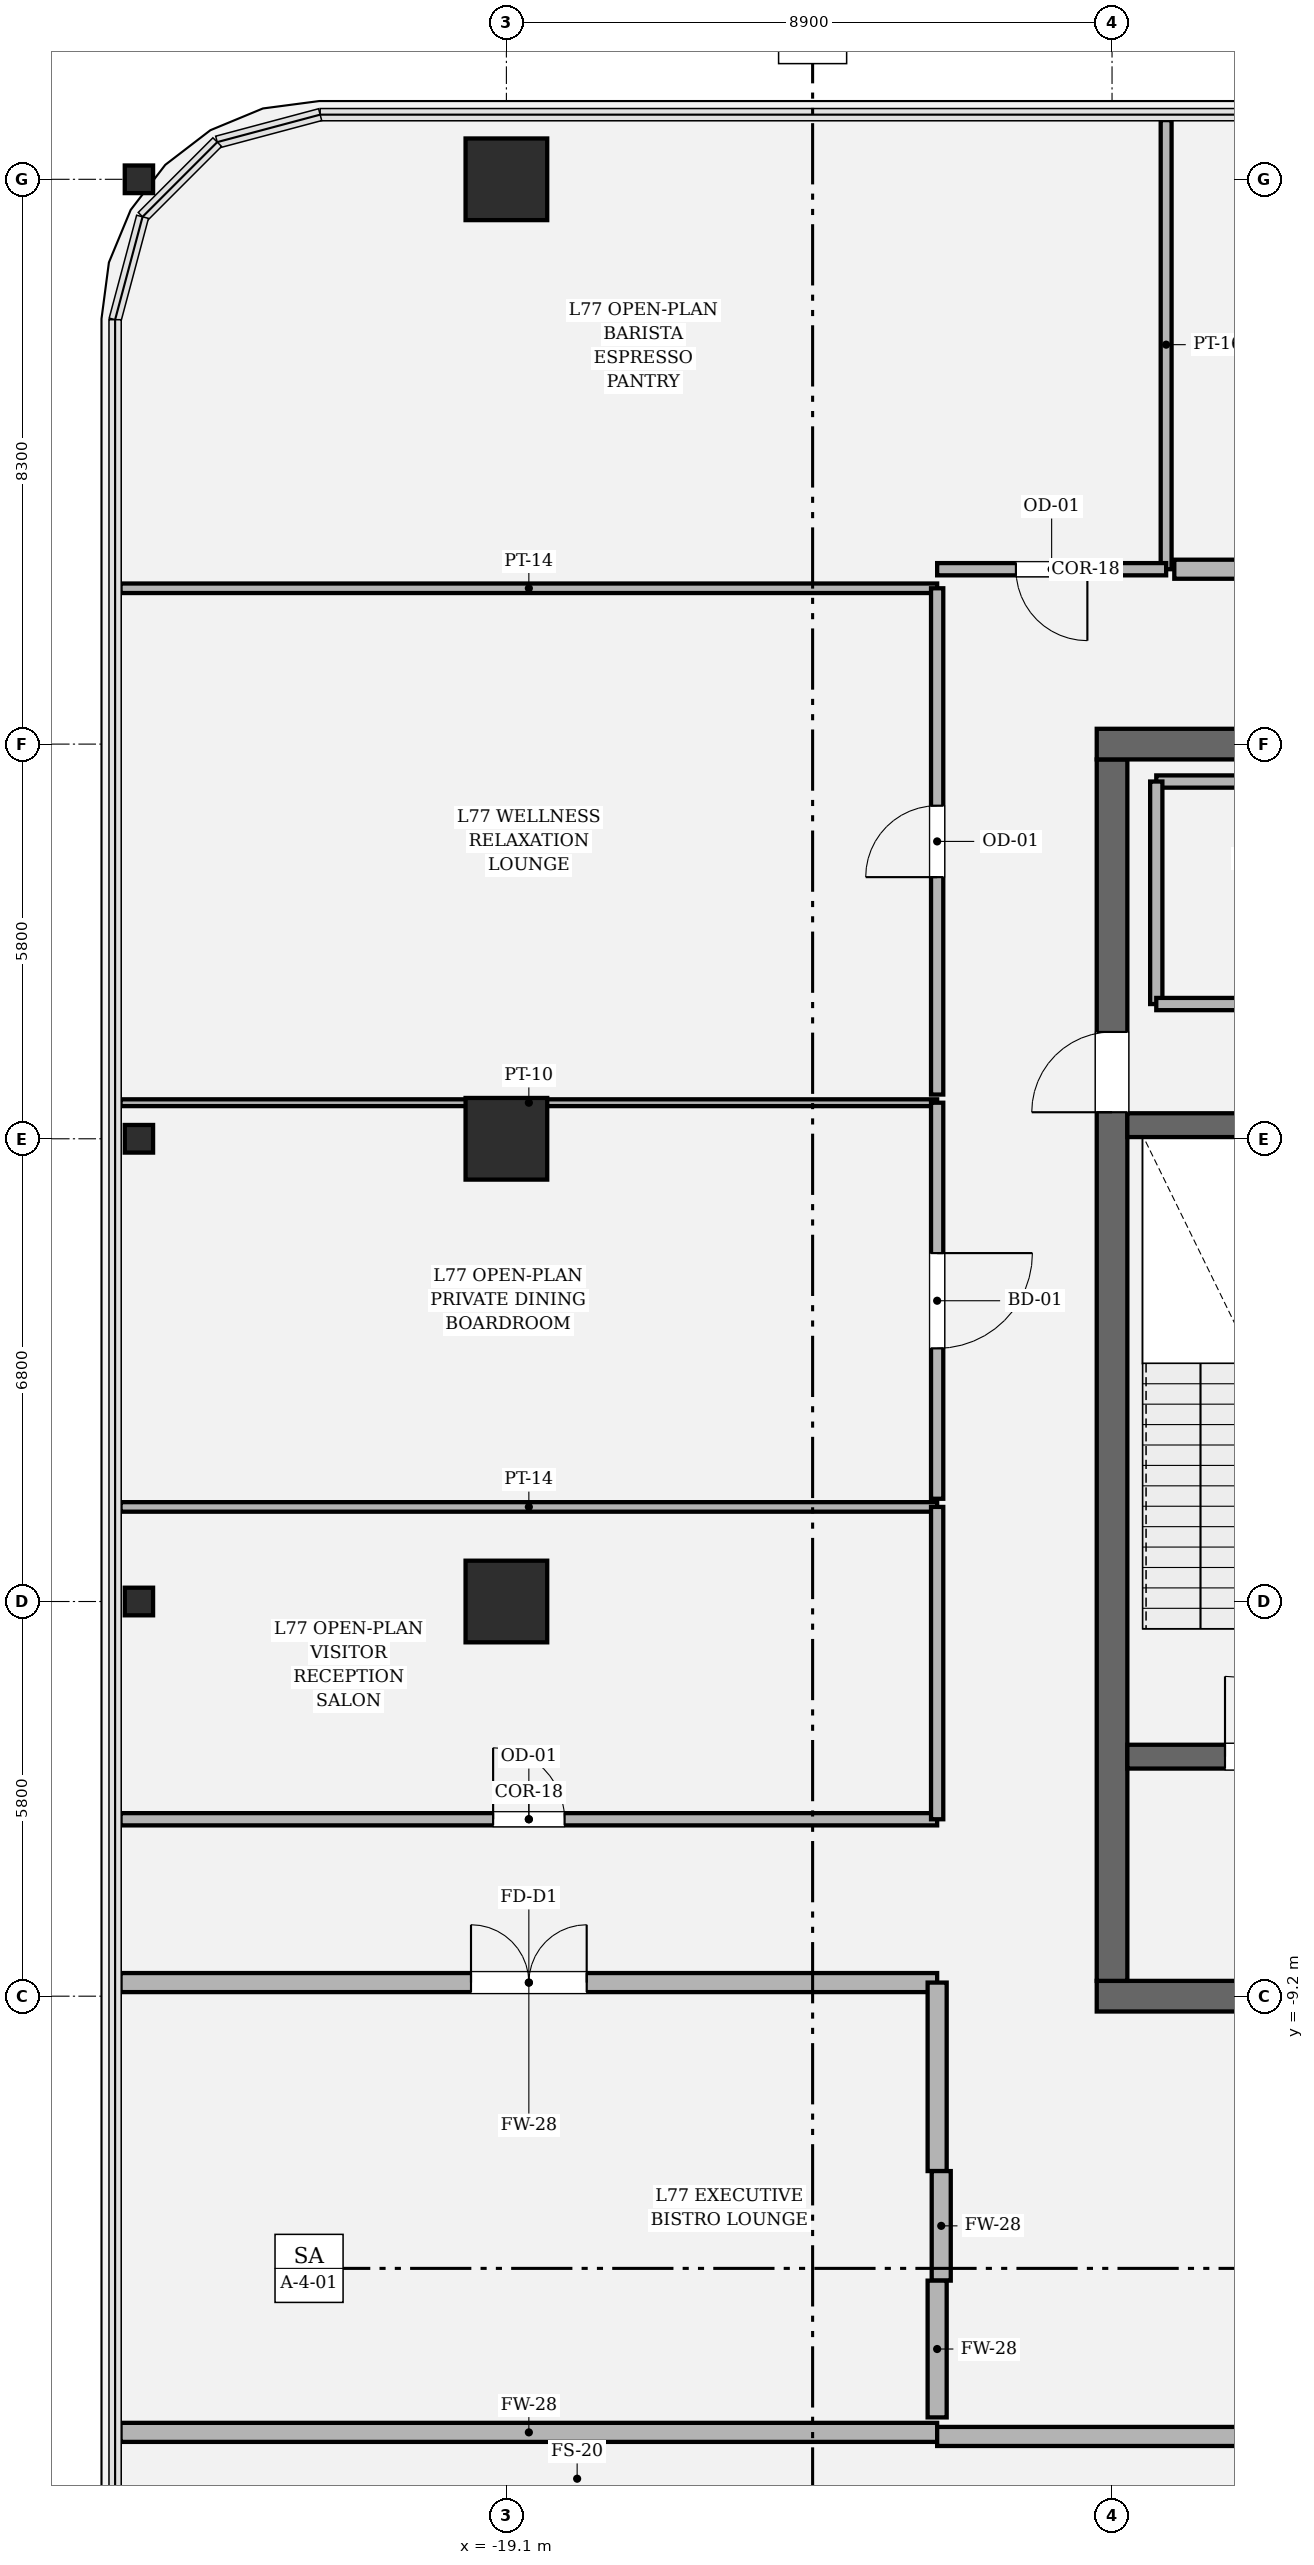
"""IFC4 building model, lengths in metres.
Left out: names, types, materials, properties, quantities, classifications, styles, units other than length and angle.
Written with IfcOpenShell. Run it as: python <this file> out.ifc"""

import sys

from ifc_helpers import new_model, si_unit, direction, frame, frame_2d, origin, origin_2d, place, context, subcontext, project, spatial, rectangle, hollow_rectangle, i_section, extrude, element, fill, save


model = new_model("IFC4")
c1 = context("Model", 3, precision=1e-05, world=origin(), true_north=direction((0.0, 1.0)))
c2 = subcontext(c1, "Body", "Model", "MODEL_VIEW")
j1 = project(units=[si_unit("LENGTHUNIT", "METRE"), si_unit("PLANEANGLEUNIT", "RADIAN")], contexts=[c1])
p1 = place(None, origin())
s1 = spatial("IfcSite", under=j1, at=p1, CompositionType="ELEMENT")
p2 = place(p1, origin())
s2 = spatial("IfcBuilding", under=s1, at=p2, CompositionType="ELEMENT")
p3 = place(p2, frame((0.0, 0.0, 325.8)))
s3 = spatial("IfcBuildingStorey", under=s2, at=p3, CompositionType="ELEMENT", Elevation=325.8)
p4 = place(p3, frame((10.425, -9.2, 0.0), z_axis=(0.0, 0.0, 1.0), x_axis=(-1.0, 0.0, 0.0)))
e1 = element("IfcWall", 1, at=p4, inside=s3, PredefinedType="SHEAR", context=c2, shape_type="SweptSolid", body=[
    extrude(rectangle(XDim=20.85, YDim=0.45, at=frame_2d((10.425, 0.0))), origin(), (0.0, 0.0, 1.0), 4.2),
])
p5 = place(p4, frame((2.7, 0.0, 0.0)))
e2 = element("IfcOpeningElement", 2, at=p5, cuts=e1, PredefinedType="OPENING", context=c2, shape_type="SweptSolid", body=[
    extrude(rectangle(XDim=1.25, YDim=2.25, at=frame_2d((0.625, 1.125))), frame((0.0, 0.235, 0.0), z_axis=(0.0, -1.0, 0.0), x_axis=(1.0, 0.0, 0.0)), (0.0, 0.0, 1.0), 0.47),
])
p6 = place(p4, frame((16.9, 0.0, 0.0)))
e3 = element("IfcOpeningElement", 3, at=p6, cuts=e1, PredefinedType="OPENING", context=c2, shape_type="SweptSolid", body=[
    extrude(rectangle(XDim=1.25, YDim=2.25, at=frame_2d((0.625, 1.125))), frame((0.0, 0.235, 0.0), z_axis=(0.0, -1.0, 0.0), x_axis=(1.0, 0.0, 0.0)), (0.0, 0.0, 1.0), 0.47),
])
p7 = place(p3, frame((-10.2, -8.975, 0.0), z_axis=(0.0, 0.0, 1.0), x_axis=(0.0, 1.0, 0.0)))
e4 = element("IfcWall", 4, at=p7, inside=s3, PredefinedType="SHEAR", context=c2, shape_type="SweptSolid", body=[
    extrude(rectangle(XDim=17.95, YDim=0.45, at=frame_2d((8.975, 0.0))), origin(), (0.0, 0.0, 1.0), 4.2),
])
p8 = place(p7, frame((12.765, 0.0, 0.0)))
e5 = element("IfcOpeningElement", 5, at=p8, cuts=e4, PredefinedType="OPENING", context=c2, shape_type="SweptSolid", body=[
    extrude(rectangle(XDim=1.18, YDim=2.2, at=frame_2d((0.59, 1.1))), frame((0.0, 0.235, 0.0), z_axis=(0.0, -1.0, 0.0), x_axis=(1.0, 0.0, 0.0)), (0.0, 0.0, 1.0), 0.47),
])
p9 = place(p3, frame((-10.425, 9.2, 0.0), z_axis=(0.0, 0.0, 1.0), x_axis=(1.0, 0.0, 0.0)))
e6 = element("IfcWall", 6, at=p9, inside=s3, PredefinedType="SHEAR", context=c2, shape_type="SweptSolid", body=[
    extrude(rectangle(XDim=20.85, YDim=0.45, at=frame_2d((10.425, 0.0))), origin(), (0.0, 0.0, 1.0), 4.2),
])
p10 = place(p3, frame((-9.975, -5.68, 0.0), z_axis=(0.0, 0.0, 1.0), x_axis=(1.0, 0.0, 0.0)))
e7 = element("IfcWall", 7, at=p10, inside=s3, PredefinedType="SOLIDWALL", context=c2, shape_type="SweptSolid", body=[
    extrude(rectangle(XDim=5.325, YDim=0.35, at=frame_2d((2.663, 0.0))), origin(), (0.0, 0.0, 1.0), 4.2),
])
p11 = place(p10, frame((1.435, 0.0, 0.0)))
e8 = element("IfcOpeningElement", 8, at=p11, cuts=e7, PredefinedType="OPENING", context=c2, shape_type="SweptSolid", body=[
    extrude(rectangle(XDim=1.18, YDim=2.2, at=frame_2d((0.59, 1.1))), frame((0.0, 0.185, 0.0), z_axis=(0.0, -1.0, 0.0), x_axis=(1.0, 0.0, 0.0)), (0.0, 0.0, 1.0), 0.37),
])
p12 = place(p3, frame((-9.975, 3.6, 0.0), z_axis=(0.0, 0.0, 1.0), x_axis=(1.0, 0.0, 0.0)))
e9 = element("IfcWall", 9, at=p12, inside=s3, PredefinedType="SOLIDWALL", context=c2, shape_type="SweptSolid", body=[
    extrude(rectangle(XDim=5.325, YDim=0.35, at=frame_2d((2.663, 0.0))), origin(), (0.0, 0.0, 1.0), 4.2),
])
for number, where, z_axis, x_axis in (
    (10, (-19.1, 17.5, 0.0), (0.0, 0.0, 1.0), (1.0, 0.0, 0.0)),
    (11, (-19.1, 3.4, 0.0), (0.0, 0.0, 1.0), (1.0, 0.0, 0.0)),
    (12, (-19.1, -3.4, 0.0), (0.0, 0.0, 1.0), (1.0, 0.0, 0.0)),
):
    element("IfcColumn", number, at=place(p3, frame(where, z_axis=z_axis, x_axis=x_axis)), inside=s3, PredefinedType="COLUMN", context=c2, shape_type="SweptSolid", body=[
        extrude(hollow_rectangle(XDim=1.2, YDim=1.2, WallThickness=0.035, at=origin_2d()), origin(), (0.0, 0.0, 1.0), 4.2),
    ])
for number, where, z_axis, x_axis in (
    (13, (-24.5, -3.4, 0.0), (0.0, 0.0, 1.0), (0.0, 1.0, 0.0)),
    (14, (-24.5, 3.4, 0.0), (0.0, 0.0, 1.0), (0.0, 1.0, 0.0)),
    (15, (-24.5, 17.5, 0.0), (0.0, 0.0, 1.0), (0.0, 1.0, 0.0)),
):
    element("IfcColumn", number, at=place(p3, frame(where, z_axis=z_axis, x_axis=x_axis)), inside=s3, PredefinedType="COLUMN", context=c2, shape_type="SweptSolid", body=[
        extrude(i_section(OverallWidth=0.406, OverallDepth=0.416, WebThickness=0.029, FlangeThickness=0.048, FilletRadius=0.018, at=origin_2d()), origin(), (0.0, 0.0, 1.0), 4.198),
    ])
p13 = place(p3, frame((-5.05, 8.65, 0.0), z_axis=(0.0, 0.0, 1.0), x_axis=(-1.0, 0.0, 0.0)))
e16 = element("IfcWall", 16, at=p13, inside=s3, PredefinedType="PARTITIONING", context=c2, shape_type="SweptSolid", body=[
    extrude(rectangle(XDim=4.5, YDim=0.18, at=frame_2d((2.25, 0.0))), origin(), (0.0, 0.0, 1.0), 4.0),
])
p14 = place(p3, frame((-9.55, 8.65, 0.0), z_axis=(0.0, 0.0, 1.0), x_axis=(0.0, -1.0, 0.0)))
e17 = element("IfcWall", 17, at=p14, inside=s3, PredefinedType="PARTITIONING", context=c2, shape_type="SweptSolid", body=[
    extrude(rectangle(XDim=3.27, YDim=0.18, at=frame_2d((1.635, 0.0))), origin(), (0.0, 0.0, 1.0), 4.0),
])
p15 = place(p3, frame((-9.55, 5.38, 0.0), z_axis=(0.0, 0.0, 1.0), x_axis=(1.0, 0.0, 0.0)))
e18 = element("IfcWall", 18, at=p15, inside=s3, PredefinedType="PARTITIONING", context=c2, shape_type="SweptSolid", body=[
    extrude(rectangle(XDim=4.5, YDim=0.18, at=frame_2d((2.25, 0.0))), origin(), (0.0, 0.0, 1.0), 4.0),
])
p16 = place(p15, frame((1.725, 0.0, 0.0)))
e19 = element("IfcOpeningElement", 19, at=p16, cuts=e18, PredefinedType="OPENING", context=c2, shape_type="SweptSolid", body=[
    extrude(rectangle(XDim=1.05, YDim=2.2, at=frame_2d((0.525, 1.1))), frame((0.0, 0.1, 0.0), z_axis=(0.0, -1.0, 0.0), x_axis=(1.0, 0.0, 0.0)), (0.0, 0.0, 1.0), 0.2),
])
p17 = place(p3, frame((-24.77, -15.61, 0.0), z_axis=(0.0, 0.0, 1.0), x_axis=(1.0, 0.0, 0.0)))
e20 = element("IfcWall", 20, at=p17, inside=s3, PredefinedType="SOLIDWALL", context=c2, shape_type="SweptSolid", body=[
    extrude(rectangle(XDim=12.0, YDim=0.28, at=frame_2d((6.0, 0.0))), origin(), (0.0, 0.0, 1.0), 2.714),
])
p18 = place(p3, frame((-12.77, -15.67, 0.0), z_axis=(0.0, 0.0, 1.0), x_axis=(1.0, 0.0, 0.0)))
e21 = element("IfcWall", 21, at=p18, inside=s3, PredefinedType="SOLIDWALL", context=c2, shape_type="SweptSolid", body=[
    extrude(rectangle(XDim=25.54, YDim=0.28, at=frame_2d((12.77, 0.0))), origin(), (0.0, 0.0, 1.0), 3.394),
])
p19 = place(p18, frame((11.92, 0.0, 0.0)))
e22 = element("IfcOpeningElement", 22, at=p19, cuts=e21, PredefinedType="OPENING", context=c2, shape_type="SweptSolid", body=[
    extrude(rectangle(XDim=1.7, YDim=2.3, at=frame_2d((0.85, 1.15))), frame((0.0, 0.15, 0.0), z_axis=(0.0, -1.0, 0.0), x_axis=(1.0, 0.0, 0.0)), (0.0, 0.0, 1.0), 0.3),
])
p20 = place(p3, frame((-24.77, -9.0, 0.0), z_axis=(0.0, 0.0, 1.0), x_axis=(1.0, 0.0, 0.0)))
e23 = element("IfcWall", 23, at=p20, inside=s3, PredefinedType="SOLIDWALL", context=c2, shape_type="SweptSolid", body=[
    extrude(rectangle(XDim=12.0, YDim=0.28, at=frame_2d((6.0, 0.0))), origin(), (0.0, 0.0, 1.0), 2.714),
])
p21 = place(p20, frame((5.15, 0.0, 0.0)))
e24 = element("IfcOpeningElement", 24, at=p21, cuts=e23, PredefinedType="OPENING", context=c2, shape_type="SweptSolid", body=[
    extrude(rectangle(XDim=1.7, YDim=2.3, at=frame_2d((0.85, 1.15))), frame((0.0, 0.15, 0.0), z_axis=(0.0, -1.0, 0.0), x_axis=(1.0, 0.0, 0.0)), (0.0, 0.0, 1.0), 0.3),
])
p22 = place(p3, frame((-12.77, -9.0, 0.0), z_axis=(0.0, 0.0, 1.0), x_axis=(0.0, -1.0, 0.0)))
e25 = element("IfcWall", 25, at=p22, inside=s3, PredefinedType="SOLIDWALL", context=c2, shape_type="SweptSolid", body=[
    extrude(rectangle(XDim=2.77, YDim=0.28, at=frame_2d((1.385, 0.0))), origin(), (0.0, 0.0, 1.0), 3.394),
])
p23 = place(p3, frame((-12.71, -11.77, 0.0), z_axis=(0.0, 0.0, 1.0), x_axis=(0.0, -1.0, 0.0)))
e26 = element("IfcWall", 26, at=p23, inside=s3, PredefinedType="SOLIDWALL", context=c2, shape_type="SweptSolid", body=[
    extrude(rectangle(XDim=1.61, YDim=0.28, at=frame_2d((0.805, 0.0))), origin(), (0.0, 0.0, 1.0), 3.634),
])
p24 = place(p3, frame((-12.77, -13.38, 0.0), z_axis=(0.0, 0.0, 1.0), x_axis=(0.0, -1.0, 0.0)))
e27 = element("IfcWall", 27, at=p24, inside=s3, PredefinedType="SOLIDWALL", context=c2, shape_type="SweptSolid", body=[
    extrude(rectangle(XDim=2.01, YDim=0.28, at=frame_2d((1.005, 0.0))), origin(), (0.0, 0.0, 1.0), 3.634),
])
p25 = place(p3, frame((-12.77, -6.6, 0.0), z_axis=(0.0, 0.0, 1.0), x_axis=(-1.0, 0.0, 0.0)))
e28 = element("IfcWall", 28, at=p25, inside=s3, PredefinedType="PARTITIONING", context=c2, shape_type="SweptSolid", body=[
    extrude(rectangle(XDim=12.0, YDim=0.18, at=frame_2d((6.0, 0.0))), origin(), (0.0, 0.0, 1.0), 2.714),
])
p26 = place(p25, frame((5.475, 0.0, 0.0)))
e29 = element("IfcOpeningElement", 29, at=p26, cuts=e28, PredefinedType="OPENING", context=c2, shape_type="SweptSolid", body=[
    extrude(rectangle(XDim=1.05, YDim=2.2, at=frame_2d((0.525, 1.1))), frame((0.0, 0.1, 0.0), z_axis=(0.0, -1.0, 0.0), x_axis=(1.0, 0.0, 0.0)), (0.0, 0.0, 1.0), 0.2),
])
p27 = place(p3, frame((-24.77, -2.01, 0.0), z_axis=(0.0, 0.0, 1.0), x_axis=(1.0, 0.0, 0.0)))
e30 = element("IfcWall", 30, at=p27, inside=s3, PredefinedType="PARTITIONING", context=c2, shape_type="SweptSolid", body=[
    extrude(rectangle(XDim=12.0, YDim=0.14, at=frame_2d((6.0, 0.0))), origin(), (0.0, 0.0, 1.0), 2.714),
])
p28 = place(p3, frame((-12.77, -2.01, 0.0), z_axis=(0.0, 0.0, 1.0), x_axis=(0.0, -1.0, 0.0)))
e31 = element("IfcWall", 31, at=p28, inside=s3, PredefinedType="PARTITIONING", context=c2, shape_type="SweptSolid", body=[
    extrude(rectangle(XDim=4.59, YDim=0.18, at=frame_2d((2.295, 0.0))), origin(), (0.0, 0.0, 1.0), 3.394),
])
p29 = place(p3, frame((-24.77, 3.93, 0.0), z_axis=(0.0, 0.0, 1.0), x_axis=(1.0, 0.0, 0.0)))
e32 = element("IfcWall", 32, at=p29, inside=s3, PredefinedType="PARTITIONING", context=c2, shape_type="SweptSolid", body=[
    extrude(rectangle(XDim=12.0, YDim=0.1, at=frame_2d((6.0, 0.0))), origin(), (0.0, 0.0, 1.0), 2.714),
])
p30 = place(p3, frame((-12.77, 3.93, 0.0), z_axis=(0.0, 0.0, 1.0), x_axis=(0.0, -1.0, 0.0)))
e33 = element("IfcWall", 33, at=p30, inside=s3, PredefinedType="PARTITIONING", context=c2, shape_type="SweptSolid", body=[
    extrude(rectangle(XDim=5.82, YDim=0.18, at=frame_2d((2.91, 0.0))), origin(), (0.0, 0.0, 1.0), 3.394),
])
p31 = place(p30, frame((2.21, 0.0, 0.0)))
e34 = element("IfcOpeningElement", 34, at=p31, cuts=e33, PredefinedType="OPENING", context=c2, shape_type="SweptSolid", body=[
    extrude(rectangle(XDim=1.4, YDim=2.25, at=frame_2d((0.7, 1.125))), frame((0.0, 0.1, 0.0), z_axis=(0.0, -1.0, 0.0), x_axis=(1.0, 0.0, 0.0)), (0.0, 0.0, 1.0), 0.2),
])
p32 = place(p3, frame((-24.77, 11.49, 0.0), z_axis=(0.0, 0.0, 1.0), x_axis=(1.0, 0.0, 0.0)))
e35 = element("IfcWall", 35, at=p32, inside=s3, PredefinedType="PARTITIONING", context=c2, shape_type="SweptSolid", body=[
    extrude(rectangle(XDim=12.0, YDim=0.14, at=frame_2d((6.0, 0.0))), origin(), (0.0, 0.0, 1.0), 2.714),
])
p33 = place(p3, frame((-12.77, 11.49, 0.0), z_axis=(0.0, 0.0, 1.0), x_axis=(0.0, -1.0, 0.0)))
e36 = element("IfcWall", 36, at=p33, inside=s3, PredefinedType="PARTITIONING", context=c2, shape_type="SweptSolid", body=[
    extrude(rectangle(XDim=7.44, YDim=0.18, at=frame_2d((3.72, 0.0))), origin(), (0.0, 0.0, 1.0), 3.394),
])
p34 = place(p33, frame((3.195, 0.0, 0.0)))
e37 = element("IfcOpeningElement", 37, at=p34, cuts=e36, PredefinedType="OPENING", context=c2, shape_type="SweptSolid", body=[
    extrude(rectangle(XDim=1.05, YDim=2.2, at=frame_2d((0.525, 1.1))), frame((0.0, 0.1, 0.0), z_axis=(0.0, -1.0, 0.0), x_axis=(1.0, 0.0, 0.0)), (0.0, 0.0, 1.0), 0.2),
])
p35 = place(p3, frame((-9.405, 18.37, 0.0), z_axis=(0.0, 0.0, 1.0), x_axis=(0.0, -1.0, 0.0)))
e38 = element("IfcWall", 38, at=p35, inside=s3, PredefinedType="PARTITIONING", context=c2, shape_type="SweptSolid", body=[
    extrude(rectangle(XDim=6.6, YDim=0.16, at=frame_2d((3.3, 0.0))), origin(), (0.0, 0.0, 1.0), 3.394),
])
p36 = place(p3, frame((-9.405, 11.77, 0.0), z_axis=(0.0, 0.0, 1.0), x_axis=(-1.0, 0.0, 0.0)))
e39 = element("IfcWall", 39, at=p36, inside=s3, PredefinedType="PARTITIONING", context=c2, shape_type="SweptSolid", body=[
    extrude(rectangle(XDim=3.365, YDim=0.18, at=frame_2d((1.683, 0.0))), origin(), (0.0, 0.0, 1.0), 3.394),
])
p37 = place(p36, frame((1.157, 0.0, 0.0)))
e40 = element("IfcOpeningElement", 40, at=p37, cuts=e39, PredefinedType="OPENING", context=c2, shape_type="SweptSolid", body=[
    extrude(rectangle(XDim=1.05, YDim=2.2, at=frame_2d((0.525, 1.1))), frame((0.0, 0.1, 0.0), z_axis=(0.0, -1.0, 0.0), x_axis=(1.0, 0.0, 0.0)), (0.0, 0.0, 1.0), 0.2),
])
p38 = place(p3, frame((8.652, 11.77, 0.0), z_axis=(0.0, 0.0, 1.0), x_axis=(-1.0, 0.0, 0.0)))
e41 = element("IfcWall", 41, at=p38, inside=s3, PredefinedType="SOLIDWALL", context=c2, shape_type="SweptSolid", body=[
    extrude(rectangle(XDim=17.937, YDim=0.28, at=frame_2d((8.969, 0.0))), origin(), (0.0, 0.0, 1.0), 3.394),
])
p39 = place(p38, frame((8.118, 0.0, 0.0)))
e42 = element("IfcOpeningElement", 42, at=p39, cuts=e41, PredefinedType="OPENING", context=c2, shape_type="SweptSolid", body=[
    extrude(rectangle(XDim=1.7, YDim=2.3, at=frame_2d((0.85, 1.15))), frame((0.0, 0.15, 0.0), z_axis=(0.0, -1.0, 0.0), x_axis=(1.0, 0.0, 0.0)), (0.0, 0.0, 1.0), 0.3),
])
p40 = place(p11, origin())
e43 = element("IfcDoor", 43, at=p40, inside=s3, OperationType="SINGLE_SWING_LEFT", PredefinedType="DOOR", context=c2, shape_type="SweptSolid", body=[
    extrude(rectangle(XDim=1.18, YDim=2.2, at=frame_2d((0.59, 1.1))), frame((0.0, 0.025, 0.0), z_axis=(0.0, -1.0, 0.0), x_axis=(1.0, 0.0, 0.0)), (0.0, 0.0, 1.0), 0.05),
])
fill(e8, e43)
p41 = place(p8, origin())
e44 = element("IfcDoor", 44, at=p41, inside=s3, OperationType="SINGLE_SWING_LEFT", PredefinedType="DOOR", context=c2, shape_type="SweptSolid", body=[
    extrude(rectangle(XDim=1.18, YDim=2.2, at=frame_2d((0.59, 1.1))), frame((0.0, 0.025, 0.0), z_axis=(0.0, -1.0, 0.0), x_axis=(1.0, 0.0, 0.0)), (0.0, 0.0, 1.0), 0.05),
])
fill(e5, e44)
p42 = place(p21, origin())
e45 = element("IfcDoor", 45, at=p42, inside=s3, OperationType="DOUBLE_DOOR_SINGLE_SWING", PredefinedType="DOOR", context=c2, shape_type="SweptSolid", body=[
    extrude(rectangle(XDim=1.7, YDim=2.3, at=frame_2d((0.85, 1.15))), frame((0.0, 0.025, 0.0), z_axis=(0.0, -1.0, 0.0), x_axis=(1.0, 0.0, 0.0)), (0.0, 0.0, 1.0), 0.05),
])
fill(e24, e45)
p43 = place(p26, origin())
e46 = element("IfcDoor", 46, at=p43, inside=s3, OperationType="SINGLE_SWING_RIGHT", PredefinedType="DOOR", context=c2, shape_type="SweptSolid", body=[
    extrude(rectangle(XDim=1.05, YDim=2.2, at=frame_2d((0.525, 1.1))), frame((0.0, 0.025, 0.0), z_axis=(0.0, -1.0, 0.0), x_axis=(1.0, 0.0, 0.0)), (0.0, 0.0, 1.0), 0.05),
])
fill(e29, e46)
p44 = place(p31, origin())
e47 = element("IfcDoor", 47, at=p44, inside=s3, OperationType="SINGLE_SWING_LEFT", PredefinedType="DOOR", context=c2, shape_type="SweptSolid", body=[
    extrude(rectangle(XDim=1.4, YDim=2.25, at=frame_2d((0.7, 1.125))), frame((0.0, 0.025, 0.0), z_axis=(0.0, -1.0, 0.0), x_axis=(1.0, 0.0, 0.0)), (0.0, 0.0, 1.0), 0.05),
])
fill(e34, e47)
p45 = place(p34, origin())
e48 = element("IfcDoor", 48, at=p45, inside=s3, OperationType="SINGLE_SWING_RIGHT", PredefinedType="DOOR", context=c2, shape_type="SweptSolid", body=[
    extrude(rectangle(XDim=1.05, YDim=2.2, at=frame_2d((0.525, 1.1))), frame((0.0, 0.025, 0.0), z_axis=(0.0, -1.0, 0.0), x_axis=(1.0, 0.0, 0.0)), (0.0, 0.0, 1.0), 0.05),
])
fill(e37, e48)
p46 = place(p37, origin())
e49 = element("IfcDoor", 49, at=p46, inside=s3, OperationType="SINGLE_SWING_LEFT", PredefinedType="DOOR", context=c2, shape_type="SweptSolid", body=[
    extrude(rectangle(XDim=1.05, YDim=2.2, at=frame_2d((0.525, 1.1))), frame((0.0, 0.025, 0.0), z_axis=(0.0, -1.0, 0.0), x_axis=(1.0, 0.0, 0.0)), (0.0, 0.0, 1.0), 0.05),
])
fill(e40, e49)
save(model, sys.argv[1])
